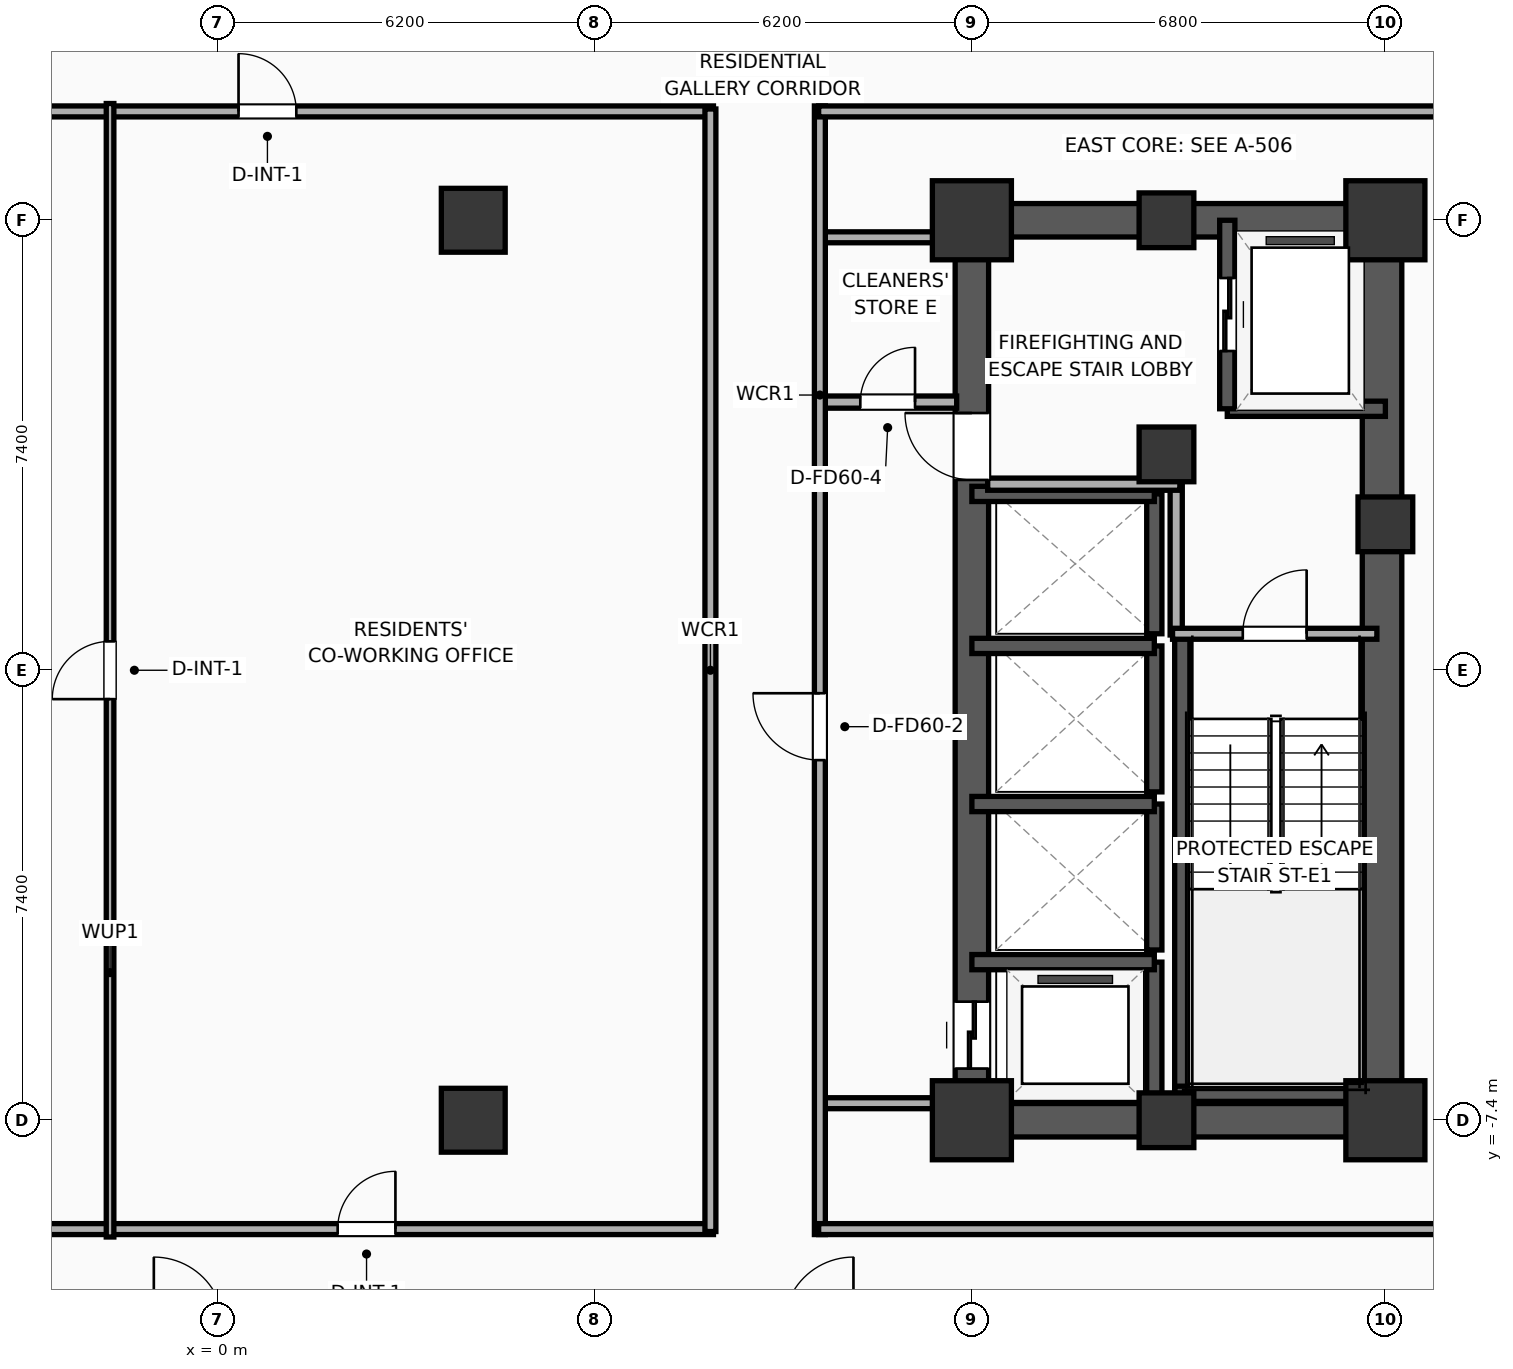
"""IFC4 building model, lengths in metres.
Left out: names, types, materials, properties, quantities, classifications, styles, units other than length and angle.
Written with IfcOpenShell. Run it as: python <this file> out.ifc"""

import sys

from ifc_helpers import new_model, si_unit, direction, frame, frame_2d, origin, origin_2d, place, context, subcontext, project, spatial, rectangle, extrude, element, fill, save


model = new_model("IFC4")
c1 = context("Model", 3, precision=1e-05, world=origin(), true_north=direction((0.0, 1.0)))
c2 = subcontext(c1, "Body", "Model", "MODEL_VIEW")
j1 = project(units=[si_unit("LENGTHUNIT", "METRE"), si_unit("PLANEANGLEUNIT", "RADIAN")], contexts=[c1])
p1 = place(None, origin())
s1 = spatial("IfcSite", under=j1, at=p1, CompositionType="ELEMENT")
p2 = place(p1, origin())
s2 = spatial("IfcBuilding", under=s1, at=p2, CompositionType="ELEMENT")
p3 = place(p2, frame((0.0, 0.0, 109.2)))
s3 = spatial("IfcBuildingStorey", under=s2, at=p3, CompositionType="ELEMENT", Elevation=109.2)
p4 = place(p3, frame((12.4, -7.4, 0.0), z_axis=(0.0, 0.0, 1.0), x_axis=(1.0, 0.0, 0.0)))
e1 = element("IfcColumn", 1, at=p4, inside=s3, PredefinedType="COLUMN", context=c2, shape_type="SweptSolid", body=[
    extrude(rectangle(XDim=1.3, YDim=1.3, at=origin_2d()), origin(), (0.0, 0.0, 1.0), 3.9),
])
p5 = place(p3, frame((15.6, 3.55, 0.0), z_axis=(0.0, 0.0, 1.0), x_axis=(1.0, 0.0, 0.0)))
e2 = element("IfcColumn", 2, at=p5, inside=s3, PredefinedType="COLUMN", context=c2, shape_type="SweptSolid", body=[
    extrude(rectangle(XDim=0.9, YDim=0.9, at=origin_2d()), origin(), (0.0, 0.0, 1.0), 3.9),
])
p6 = place(p3, frame((12.4, 7.4, 0.0), z_axis=(0.0, 0.0, 1.0), x_axis=(1.0, 0.0, 0.0)))
e3 = element("IfcColumn", 3, at=p6, inside=s3, PredefinedType="COLUMN", context=c2, shape_type="SweptSolid", body=[
    extrude(rectangle(XDim=1.3, YDim=1.3, at=origin_2d()), origin(), (0.0, 0.0, 1.0), 3.9),
])
for number, where, z_axis, x_axis in (
    (4, (15.6, -7.4, 0.0), (0.0, 0.0, 1.0), (1.0, 0.0, 0.0)),
    (5, (15.6, 7.4, 0.0), (0.0, 0.0, 1.0), (1.0, 0.0, 0.0)),
):
    element("IfcColumn", number, at=place(p3, frame(where, z_axis=z_axis, x_axis=x_axis)), inside=s3, PredefinedType="COLUMN", context=c2, shape_type="SweptSolid", body=[
        extrude(rectangle(XDim=0.9, YDim=0.9, at=origin_2d()), origin(), (0.0, 0.0, 1.0), 3.9),
    ])
p7 = place(p3, frame((19.2, -7.4, 0.0), z_axis=(0.0, 0.0, 1.0), x_axis=(1.0, 0.0, 0.0)))
e6 = element("IfcColumn", 6, at=p7, inside=s3, PredefinedType="COLUMN", context=c2, shape_type="SweptSolid", body=[
    extrude(rectangle(XDim=1.3, YDim=1.3, at=origin_2d()), origin(), (0.0, 0.0, 1.0), 3.9),
])
p8 = place(p3, frame((19.2, 2.4, 0.0), z_axis=(0.0, 0.0, 1.0), x_axis=(1.0, 0.0, 0.0)))
e7 = element("IfcColumn", 7, at=p8, inside=s3, PredefinedType="COLUMN", context=c2, shape_type="SweptSolid", body=[
    extrude(rectangle(XDim=0.9, YDim=0.9, at=origin_2d()), origin(), (0.0, 0.0, 1.0), 3.9),
])
p9 = place(p3, frame((19.2, 7.4, 0.0), z_axis=(0.0, 0.0, 1.0), x_axis=(1.0, 0.0, 0.0)))
e8 = element("IfcColumn", 8, at=p9, inside=s3, PredefinedType="COLUMN", context=c2, shape_type="SweptSolid", body=[
    extrude(rectangle(XDim=1.3, YDim=1.3, at=origin_2d()), origin(), (0.0, 0.0, 1.0), 3.9),
])
for number, where, z_axis, x_axis in (
    (9, (12.125, -7.4, 0.0), (0.0, 0.0, 1.0), (1.0, 0.0, 0.0)),
    (10, (12.125, 7.4, 0.0), (0.0, 0.0, 1.0), (1.0, 0.0, 0.0)),
):
    element("IfcWall", number, at=place(p3, frame(where, z_axis=z_axis, x_axis=x_axis)), inside=s3, PredefinedType="SHEAR", context=c2, shape_type="SweptSolid", body=[
        extrude(rectangle(XDim=7.35, YDim=0.55, at=frame_2d((3.675, 0.0))), origin(), (0.0, 0.0, 1.0), 3.65),
    ])
p10 = place(p3, frame((12.4, -7.4, 0.0), z_axis=(0.0, 0.0, 1.0), x_axis=(0.0, 1.0, 0.0)))
e11 = element("IfcWall", 11, at=p10, inside=s3, PredefinedType="SHEAR", context=c2, shape_type="SweptSolid", body=[
    extrude(rectangle(XDim=14.8, YDim=0.55, at=frame_2d((7.4, 0.0))), origin(), (0.0, 0.0, 1.0), 3.65),
])
p11 = place(p10, frame((0.85, 0.0, 0.0)))
e12 = element("IfcOpeningElement", 12, at=p11, cuts=e11, PredefinedType="OPENING", context=c2, shape_type="SweptSolid", body=[
    extrude(rectangle(XDim=1.1, YDim=2.05, at=frame_2d((0.55, 1.025))), frame((0.0, 0.285, 0.0), z_axis=(0.0, -1.0, 0.0), x_axis=(1.0, 0.0, 0.0)), (0.0, 0.0, 1.0), 0.57),
])
p12 = place(p10, frame((10.53, 0.0, 0.0)))
e13 = element("IfcOpeningElement", 13, at=p12, cuts=e11, PredefinedType="OPENING", context=c2, shape_type="SweptSolid", body=[
    extrude(rectangle(XDim=1.1, YDim=2.05, at=frame_2d((0.55, 1.025))), frame((0.0, 0.285, 0.0), z_axis=(0.0, -1.0, 0.0), x_axis=(1.0, 0.0, 0.0)), (0.0, 0.0, 1.0), 0.57),
])
p13 = place(p3, frame((19.145, -7.4, 0.0), z_axis=(0.0, 0.0, 1.0), x_axis=(0.0, 1.0, 0.0)))
e14 = element("IfcWall", 14, at=p13, inside=s3, PredefinedType="SHEAR", context=c2, shape_type="SweptSolid", body=[
    extrude(rectangle(XDim=14.8, YDim=0.65, at=frame_2d((7.4, 0.0))), origin(), (0.0, 0.0, 1.0), 3.65),
])
p14 = place(p3, frame((15.86, -7.085, 0.0), z_axis=(0.0, 0.0, 1.0), x_axis=(0.0, 1.0, 0.0)))
e15 = element("IfcWall", 15, at=p14, inside=s3, PredefinedType="SOLIDWALL", context=c2, shape_type="SweptSolid", body=[
    extrude(rectangle(XDim=7.685, YDim=0.25, at=frame_2d((3.843, 0.0))), origin(), (0.0, 0.0, 1.0), 3.65),
])
p15 = place(p3, frame((15.74, -6.965, 0.0), z_axis=(0.0, 0.0, 1.0), x_axis=(1.0, 0.0, 0.0)))
e16 = element("IfcWall", 16, at=p15, inside=s3, PredefinedType="SOLIDWALL", context=c2, shape_type="SweptSolid", body=[
    extrude(rectangle(XDim=3.46, YDim=0.25, at=frame_2d((1.73, 0.0))), origin(), (0.0, 0.0, 1.0), 3.65),
])
for number, where, z_axis, x_axis in (
    (17, (4.2, -7.4, 0.0), (0.0, 0.0, 1.0), (1.0, 0.0, 0.0)),
    (18, (4.2, 7.4, 0.0), (0.0, 0.0, 1.0), (1.0, 0.0, 0.0)),
):
    element("IfcColumn", number, at=place(p3, frame(where, z_axis=z_axis, x_axis=x_axis)), inside=s3, PredefinedType="COLUMN", context=c2, shape_type="SweptSolid", body=[
        extrude(rectangle(XDim=1.05, YDim=1.05, at=origin_2d()), origin(), (0.0, 0.0, 1.0), 3.9),
    ])
p16 = place(p3, frame((16.6, 4.3, 0.0), z_axis=(0.0, 0.0, 1.0), x_axis=(1.0, 0.0, 0.0)))
e19 = element("IfcWall", 19, at=p16, inside=s3, PredefinedType="SOLIDWALL", context=c2, shape_type="SweptSolid", body=[
    extrude(rectangle(XDim=2.6, YDim=0.25, at=frame_2d((1.3, 0.0))), origin(), (0.0, 0.0, 1.0), 3.65),
])
p17 = place(p3, frame((16.6, 7.4, 0.0), z_axis=(0.0, 0.0, 1.0), x_axis=(0.0, -1.0, 0.0)))
e20 = element("IfcWall", 20, at=p17, inside=s3, PredefinedType="SOLIDWALL", context=c2, shape_type="SweptSolid", body=[
    extrude(rectangle(XDim=3.1, YDim=0.25, at=frame_2d((1.55, 0.0))), origin(), (0.0, 0.0, 1.0), 3.65),
])
p18 = place(p17, frame((0.95, 0.0, 0.0)))
e21 = element("IfcOpeningElement", 21, at=p18, cuts=e20, PredefinedType="OPENING", context=c2, shape_type="SweptSolid", body=[
    extrude(rectangle(XDim=1.2, YDim=2.05, at=frame_2d((0.6, 1.025))), frame((0.0, 0.135, 0.0), z_axis=(0.0, -1.0, 0.0), x_axis=(1.0, 0.0, 0.0)), (0.0, 0.0, 1.0), 0.27),
])
p19 = place(p3, frame((15.4, -7.4, 0.0), z_axis=(0.0, 0.0, 1.0), x_axis=(0.0, 1.0, 0.0)))
e22 = element("IfcWall", 22, at=p19, inside=s3, PredefinedType="SOLIDWALL", context=c2, shape_type="SweptSolid", body=[
    extrude(rectangle(XDim=2.6, YDim=0.25, at=frame_2d((1.3, 0.0))), origin(), (0.0, 0.0, 1.0), 3.65),
])
p20 = place(p3, frame((15.4, -4.8, 0.0), z_axis=(0.0, 0.0, 1.0), x_axis=(-1.0, 0.0, 0.0)))
e23 = element("IfcWall", 23, at=p20, inside=s3, PredefinedType="SOLIDWALL", context=c2, shape_type="SweptSolid", body=[
    extrude(rectangle(XDim=3.0, YDim=0.25, at=frame_2d((1.5, 0.0))), origin(), (0.0, 0.0, 1.0), 3.65),
])
p21 = place(p3, frame((15.4, -4.6, 0.0), z_axis=(0.0, 0.0, 1.0), x_axis=(0.0, 1.0, 0.0)))
e24 = element("IfcWall", 24, at=p21, inside=s3, PredefinedType="SOLIDWALL", context=c2, shape_type="SweptSolid", body=[
    extrude(rectangle(XDim=2.4, YDim=0.25, at=frame_2d((1.2, 0.0))), origin(), (0.0, 0.0, 1.0), 3.65),
])
p22 = place(p3, frame((15.4, -2.2, 0.0), z_axis=(0.0, 0.0, 1.0), x_axis=(-1.0, 0.0, 0.0)))
e25 = element("IfcWall", 25, at=p22, inside=s3, PredefinedType="SOLIDWALL", context=c2, shape_type="SweptSolid", body=[
    extrude(rectangle(XDim=3.0, YDim=0.25, at=frame_2d((1.5, 0.0))), origin(), (0.0, 0.0, 1.0), 3.65),
])
p23 = place(p3, frame((15.4, -2.0, 0.0), z_axis=(0.0, 0.0, 1.0), x_axis=(0.0, 1.0, 0.0)))
e26 = element("IfcWall", 26, at=p23, inside=s3, PredefinedType="SOLIDWALL", context=c2, shape_type="SweptSolid", body=[
    extrude(rectangle(XDim=2.4, YDim=0.25, at=frame_2d((1.2, 0.0))), origin(), (0.0, 0.0, 1.0), 3.65),
])
p24 = place(p3, frame((15.4, 0.4, 0.0), z_axis=(0.0, 0.0, 1.0), x_axis=(-1.0, 0.0, 0.0)))
e27 = element("IfcWall", 27, at=p24, inside=s3, PredefinedType="SOLIDWALL", context=c2, shape_type="SweptSolid", body=[
    extrude(rectangle(XDim=3.0, YDim=0.25, at=frame_2d((1.5, 0.0))), origin(), (0.0, 0.0, 1.0), 3.65),
])
p25 = place(p3, frame((15.4, 0.6, 0.0), z_axis=(0.0, 0.0, 1.0), x_axis=(0.0, 1.0, 0.0)))
e28 = element("IfcWall", 28, at=p25, inside=s3, PredefinedType="SOLIDWALL", context=c2, shape_type="SweptSolid", body=[
    extrude(rectangle(XDim=2.3, YDim=0.25, at=frame_2d((1.15, 0.0))), origin(), (0.0, 0.0, 1.0), 3.65),
])
p26 = place(p3, frame((15.4, 2.9, 0.0), z_axis=(0.0, 0.0, 1.0), x_axis=(-1.0, 0.0, 0.0)))
e29 = element("IfcWall", 29, at=p26, inside=s3, PredefinedType="SOLIDWALL", context=c2, shape_type="SweptSolid", body=[
    extrude(rectangle(XDim=3.0, YDim=0.25, at=frame_2d((1.5, 0.0))), origin(), (0.0, 0.0, 1.0), 3.65),
])
p27 = place(p3, frame((15.76, 0.58, 0.0), z_axis=(0.0, 0.0, 1.0), x_axis=(0.0, 1.0, 0.0)))
e30 = element("IfcWall", 30, at=p27, inside=s3, PredefinedType="PARTITIONING", context=c2, shape_type="SweptSolid", body=[
    extrude(rectangle(XDim=2.52, YDim=0.2, at=frame_2d((1.26, 0.0))), origin(), (0.0, 0.0, 1.0), 3.65),
])
p28 = place(p3, frame((12.66, 3.06, 0.0), z_axis=(0.0, 0.0, 1.0), x_axis=(1.0, 0.0, 0.0)))
e31 = element("IfcWall", 31, at=p28, inside=s3, PredefinedType="PARTITIONING", context=c2, shape_type="SweptSolid", body=[
    extrude(rectangle(XDim=3.16, YDim=0.2, at=frame_2d((1.58, 0.0))), origin(), (0.0, 0.0, 1.0), 3.65),
])
p29 = place(p3, frame((15.7, 0.6, 0.0), z_axis=(0.0, 0.0, 1.0), x_axis=(1.0, 0.0, 0.0)))
e32 = element("IfcWall", 32, at=p29, inside=s3, PredefinedType="PARTITIONING", context=c2, shape_type="SweptSolid", body=[
    extrude(rectangle(XDim=3.36, YDim=0.18, at=frame_2d((1.68, 0.0))), origin(), (0.0, 0.0, 1.0), 3.65),
])
p30 = place(p29, frame((1.155, 0.0, 0.0)))
e33 = element("IfcOpeningElement", 33, at=p30, cuts=e32, PredefinedType="OPENING", context=c2, shape_type="SweptSolid", body=[
    extrude(rectangle(XDim=1.05, YDim=2.05, at=frame_2d((0.525, 1.025))), frame((0.0, 0.1, 0.0), z_axis=(0.0, -1.0, 0.0), x_axis=(1.0, 0.0, 0.0)), (0.0, 0.0, 1.0), 0.2),
])
p31 = place(p3, frame((9.88, 4.41, 0.0), z_axis=(0.0, 0.0, 1.0), x_axis=(1.0, 0.0, 0.0)))
e34 = element("IfcWall", 34, at=p31, inside=s3, PredefinedType="PARTITIONING", context=c2, shape_type="SweptSolid", body=[
    extrude(rectangle(XDim=2.27, YDim=0.2, at=frame_2d((1.135, 0.0))), origin(), (0.0, 0.0, 1.0), 3.65),
])
p32 = place(p31, frame((0.685, 0.0, 0.0)))
e35 = element("IfcOpeningElement", 35, at=p32, cuts=e34, PredefinedType="OPENING", context=c2, shape_type="SweptSolid", body=[
    extrude(rectangle(XDim=0.9, YDim=2.05, at=frame_2d((0.45, 1.025))), frame((0.0, 0.11, 0.0), z_axis=(0.0, -1.0, 0.0), x_axis=(1.0, 0.0, 0.0)), (0.0, 0.0, 1.0), 0.22),
])
for number, where, z_axis, x_axis in (
    (36, (9.88, 7.12, 0.0), (0.0, 0.0, 1.0), (1.0, 0.0, 0.0)),
    (37, (9.88, -7.12, 0.0), (0.0, 0.0, 1.0), (1.0, 0.0, 0.0)),
):
    element("IfcWall", number, at=place(p3, frame(where, z_axis=z_axis, x_axis=x_axis)), inside=s3, PredefinedType="PARTITIONING", context=c2, shape_type="SweptSolid", body=[
        extrude(rectangle(XDim=2.27, YDim=0.18, at=frame_2d((1.135, 0.0))), origin(), (0.0, 0.0, 1.0), 3.65),
    ])
p33 = place(p3, frame((9.9, -9.28, 0.0), z_axis=(0.0, 0.0, 1.0), x_axis=(0.0, 1.0, 0.0)))
e38 = element("IfcWall", 38, at=p33, inside=s3, PredefinedType="PARTITIONING", context=c2, shape_type="SweptSolid", body=[
    extrude(rectangle(XDim=18.56, YDim=0.18, at=frame_2d((9.28, 0.0))), origin(), (0.0, 0.0, 1.0), 3.65),
])
p34 = place(p33, frame((7.802, 0.0, 0.0)))
e39 = element("IfcOpeningElement", 39, at=p34, cuts=e38, PredefinedType="OPENING", context=c2, shape_type="SweptSolid", body=[
    extrude(rectangle(XDim=1.1, YDim=2.05, at=frame_2d((0.55, 1.025))), frame((0.0, 0.1, 0.0), z_axis=(0.0, -1.0, 0.0), x_axis=(1.0, 0.0, 0.0)), (0.0, 0.0, 1.0), 0.2),
])
p35 = place(p3, frame((9.88, 9.19, 0.0), z_axis=(0.0, 0.0, 1.0), x_axis=(1.0, 0.0, 0.0)))
e40 = element("IfcWall", 40, at=p35, inside=s3, PredefinedType="PARTITIONING", context=c2, shape_type="SweptSolid", body=[
    extrude(rectangle(XDim=23.33, YDim=0.18, at=frame_2d((11.665, 0.0))), origin(), (0.0, 0.0, 1.0), 3.65),
])
p36 = place(p35, frame((17.366, 0.0, 0.0)))
e41 = element("IfcOpeningElement", 41, at=p36, cuts=e40, PredefinedType="OPENING", context=c2, shape_type="SweptSolid", body=[
    extrude(rectangle(XDim=1.15, YDim=2.05, at=frame_2d((0.575, 1.025))), frame((0.0, 0.1, 0.0), z_axis=(0.0, -1.0, 0.0), x_axis=(1.0, 0.0, 0.0)), (0.0, 0.0, 1.0), 0.2),
])
p37 = place(p3, frame((9.88, -9.19, 0.0), z_axis=(0.0, 0.0, 1.0), x_axis=(1.0, 0.0, 0.0)))
e42 = element("IfcWall", 42, at=p37, inside=s3, PredefinedType="PARTITIONING", context=c2, shape_type="SweptSolid", body=[
    extrude(rectangle(XDim=23.33, YDim=0.18, at=frame_2d((11.665, 0.0))), origin(), (0.0, 0.0, 1.0), 3.65),
])
p38 = place(p3, frame((-8.15, 9.19, 0.0), z_axis=(0.0, 0.0, 1.0), x_axis=(1.0, 0.0, 0.0)))
e43 = element("IfcWall", 43, at=p38, inside=s3, PredefinedType="PARTITIONING", context=c2, shape_type="SweptSolid", body=[
    extrude(rectangle(XDim=16.3, YDim=0.18, at=frame_2d((8.15, 0.0))), origin(), (0.0, 0.0, 1.0), 3.65),
])
p39 = place(p38, frame((8.49, 0.0, 0.0)))
e44 = element("IfcOpeningElement", 44, at=p39, cuts=e43, PredefinedType="OPENING", context=c2, shape_type="SweptSolid", body=[
    extrude(rectangle(XDim=0.95, YDim=2.05, at=frame_2d((0.475, 1.025))), frame((0.0, 0.1, 0.0), z_axis=(0.0, -1.0, 0.0), x_axis=(1.0, 0.0, 0.0)), (0.0, 0.0, 1.0), 0.2),
])
p40 = place(p3, frame((-8.15, -9.19, 0.0), z_axis=(0.0, 0.0, 1.0), x_axis=(1.0, 0.0, 0.0)))
e45 = element("IfcWall", 45, at=p40, inside=s3, PredefinedType="PARTITIONING", context=c2, shape_type="SweptSolid", body=[
    extrude(rectangle(XDim=16.3, YDim=0.18, at=frame_2d((8.15, 0.0))), origin(), (0.0, 0.0, 1.0), 3.65),
])
p41 = place(p40, frame((1.13, 0.0, 0.0)))
e46 = element("IfcOpeningElement", 46, at=p41, cuts=e45, PredefinedType="OPENING", context=c2, shape_type="SweptSolid", body=[
    extrude(rectangle(XDim=1.0, YDim=2.05, at=frame_2d((0.5, 1.025))), frame((0.0, 0.1, 0.0), z_axis=(0.0, -1.0, 0.0), x_axis=(1.0, 0.0, 0.0)), (0.0, 0.0, 1.0), 0.2),
])
p42 = place(p40, frame((10.12, 0.0, 0.0)))
e47 = element("IfcOpeningElement", 47, at=p42, cuts=e45, PredefinedType="OPENING", context=c2, shape_type="SweptSolid", body=[
    extrude(rectangle(XDim=0.95, YDim=2.05, at=frame_2d((0.475, 1.025))), frame((0.0, 0.1, 0.0), z_axis=(0.0, -1.0, 0.0), x_axis=(1.0, 0.0, 0.0)), (0.0, 0.0, 1.0), 0.2),
])
p43 = place(p3, frame((8.1, -9.23, 0.0), z_axis=(0.0, 0.0, 1.0), x_axis=(0.0, 1.0, 0.0)))
e48 = element("IfcWall", 48, at=p43, inside=s3, PredefinedType="PARTITIONING", context=c2, shape_type="SweptSolid", body=[
    extrude(rectangle(XDim=18.46, YDim=0.18, at=frame_2d((9.23, 0.0))), origin(), (0.0, 0.0, 1.0), 3.65),
])
p44 = place(p3, frame((-1.773, -9.32, 0.0), z_axis=(0.0, 0.0, 1.0), x_axis=(0.0, 1.0, 0.0)))
e49 = element("IfcWall", 49, at=p44, inside=s3, PredefinedType="PARTITIONING", context=c2, shape_type="SweptSolid", body=[
    extrude(rectangle(XDim=18.64, YDim=0.125, at=frame_2d((9.32, 0.0))), origin(), (0.0, 0.0, 1.0), 3.65),
])
p45 = place(p44, frame((8.845, 0.0, 0.0)))
e50 = element("IfcOpeningElement", 50, at=p45, cuts=e49, PredefinedType="OPENING", context=c2, shape_type="SweptSolid", body=[
    extrude(rectangle(XDim=0.95, YDim=2.05, at=frame_2d((0.475, 1.025))), frame((0.0, 0.073, 0.0), z_axis=(0.0, -1.0, 0.0), x_axis=(1.0, 0.0, 0.0)), (0.0, 0.0, 1.0), 0.145),
])
p46 = place(p18, origin())
e51 = element("IfcDoor", 51, at=p46, inside=s3, OperationType="SLIDING_TO_LEFT", PredefinedType="DOOR", context=c2, shape_type="SweptSolid", body=[
    extrude(rectangle(XDim=1.2, YDim=2.05, at=frame_2d((0.6, 1.025))), frame((0.0, 0.025, 0.0), z_axis=(0.0, -1.0, 0.0), x_axis=(1.0, 0.0, 0.0)), (0.0, 0.0, 1.0), 0.05),
])
fill(e21, e51)
p47 = place(p11, origin())
e52 = element("IfcDoor", 52, at=p47, inside=s3, OperationType="SLIDING_TO_LEFT", PredefinedType="DOOR", context=c2, shape_type="SweptSolid", body=[
    extrude(rectangle(XDim=1.1, YDim=2.05, at=frame_2d((0.55, 1.025))), frame((0.0, 0.025, 0.0), z_axis=(0.0, -1.0, 0.0), x_axis=(1.0, 0.0, 0.0)), (0.0, 0.0, 1.0), 0.05),
])
fill(e12, e52)
p48 = place(p30, origin())
e53 = element("IfcDoor", 53, at=p48, inside=s3, OperationType="SINGLE_SWING_RIGHT", PredefinedType="DOOR", context=c2, shape_type="SweptSolid", body=[
    extrude(rectangle(XDim=1.05, YDim=2.05, at=frame_2d((0.525, 1.025))), frame((0.0, 0.025, 0.0), z_axis=(0.0, -1.0, 0.0), x_axis=(1.0, 0.0, 0.0)), (0.0, 0.0, 1.0), 0.05),
])
fill(e33, e53)
p49 = place(p32, origin())
e54 = element("IfcDoor", 54, at=p49, inside=s3, OperationType="SINGLE_SWING_RIGHT", PredefinedType="DOOR", context=c2, shape_type="SweptSolid", body=[
    extrude(rectangle(XDim=0.9, YDim=2.05, at=frame_2d((0.45, 1.025))), frame((0.0, 0.025, 0.0), z_axis=(0.0, -1.0, 0.0), x_axis=(1.0, 0.0, 0.0)), (0.0, 0.0, 1.0), 0.05),
])
fill(e35, e54)
p50 = place(p34, origin())
e55 = element("IfcDoor", 55, at=p50, inside=s3, OperationType="SINGLE_SWING_RIGHT", PredefinedType="DOOR", context=c2, shape_type="SweptSolid", body=[
    extrude(rectangle(XDim=1.1, YDim=2.05, at=frame_2d((0.55, 1.025))), frame((0.0, 0.025, 0.0), z_axis=(0.0, -1.0, 0.0), x_axis=(1.0, 0.0, 0.0)), (0.0, 0.0, 1.0), 0.05),
])
fill(e39, e55)
p51 = place(p39, origin())
e56 = element("IfcDoor", 56, at=p51, inside=s3, OperationType="SINGLE_SWING_LEFT", PredefinedType="DOOR", context=c2, shape_type="SweptSolid", body=[
    extrude(rectangle(XDim=0.95, YDim=2.05, at=frame_2d((0.475, 1.025))), frame((0.0, 0.025, 0.0), z_axis=(0.0, -1.0, 0.0), x_axis=(1.0, 0.0, 0.0)), (0.0, 0.0, 1.0), 0.05),
])
fill(e44, e56)
p52 = place(p42, origin())
e57 = element("IfcDoor", 57, at=p52, inside=s3, OperationType="SINGLE_SWING_RIGHT", PredefinedType="DOOR", context=c2, shape_type="SweptSolid", body=[
    extrude(rectangle(XDim=0.95, YDim=2.05, at=frame_2d((0.475, 1.025))), frame((0.0, 0.025, 0.0), z_axis=(0.0, -1.0, 0.0), x_axis=(1.0, 0.0, 0.0)), (0.0, 0.0, 1.0), 0.05),
])
fill(e47, e57)
p53 = place(p45, origin())
e58 = element("IfcDoor", 58, at=p53, inside=s3, OperationType="SINGLE_SWING_LEFT", PredefinedType="DOOR", context=c2, shape_type="SweptSolid", body=[
    extrude(rectangle(XDim=0.95, YDim=2.05, at=frame_2d((0.475, 1.025))), frame((0.0, 0.025, 0.0), z_axis=(0.0, -1.0, 0.0), x_axis=(1.0, 0.0, 0.0)), (0.0, 0.0, 1.0), 0.05),
])
fill(e50, e58)
p54 = place(p12, origin())
e59 = element("IfcDoor", 59, at=p54, inside=s3, OperationType="SINGLE_SWING_RIGHT", PredefinedType="DOOR", context=c2, shape_type="SweptSolid", body=[
    extrude(rectangle(XDim=1.1, YDim=2.05, at=frame_2d((0.55, 1.025))), frame((0.0, 0.025, 0.0), z_axis=(0.0, -1.0, 0.0), x_axis=(1.0, 0.0, 0.0)), (0.0, 0.0, 1.0), 0.05),
])
fill(e13, e59)
save(model, sys.argv[1])
